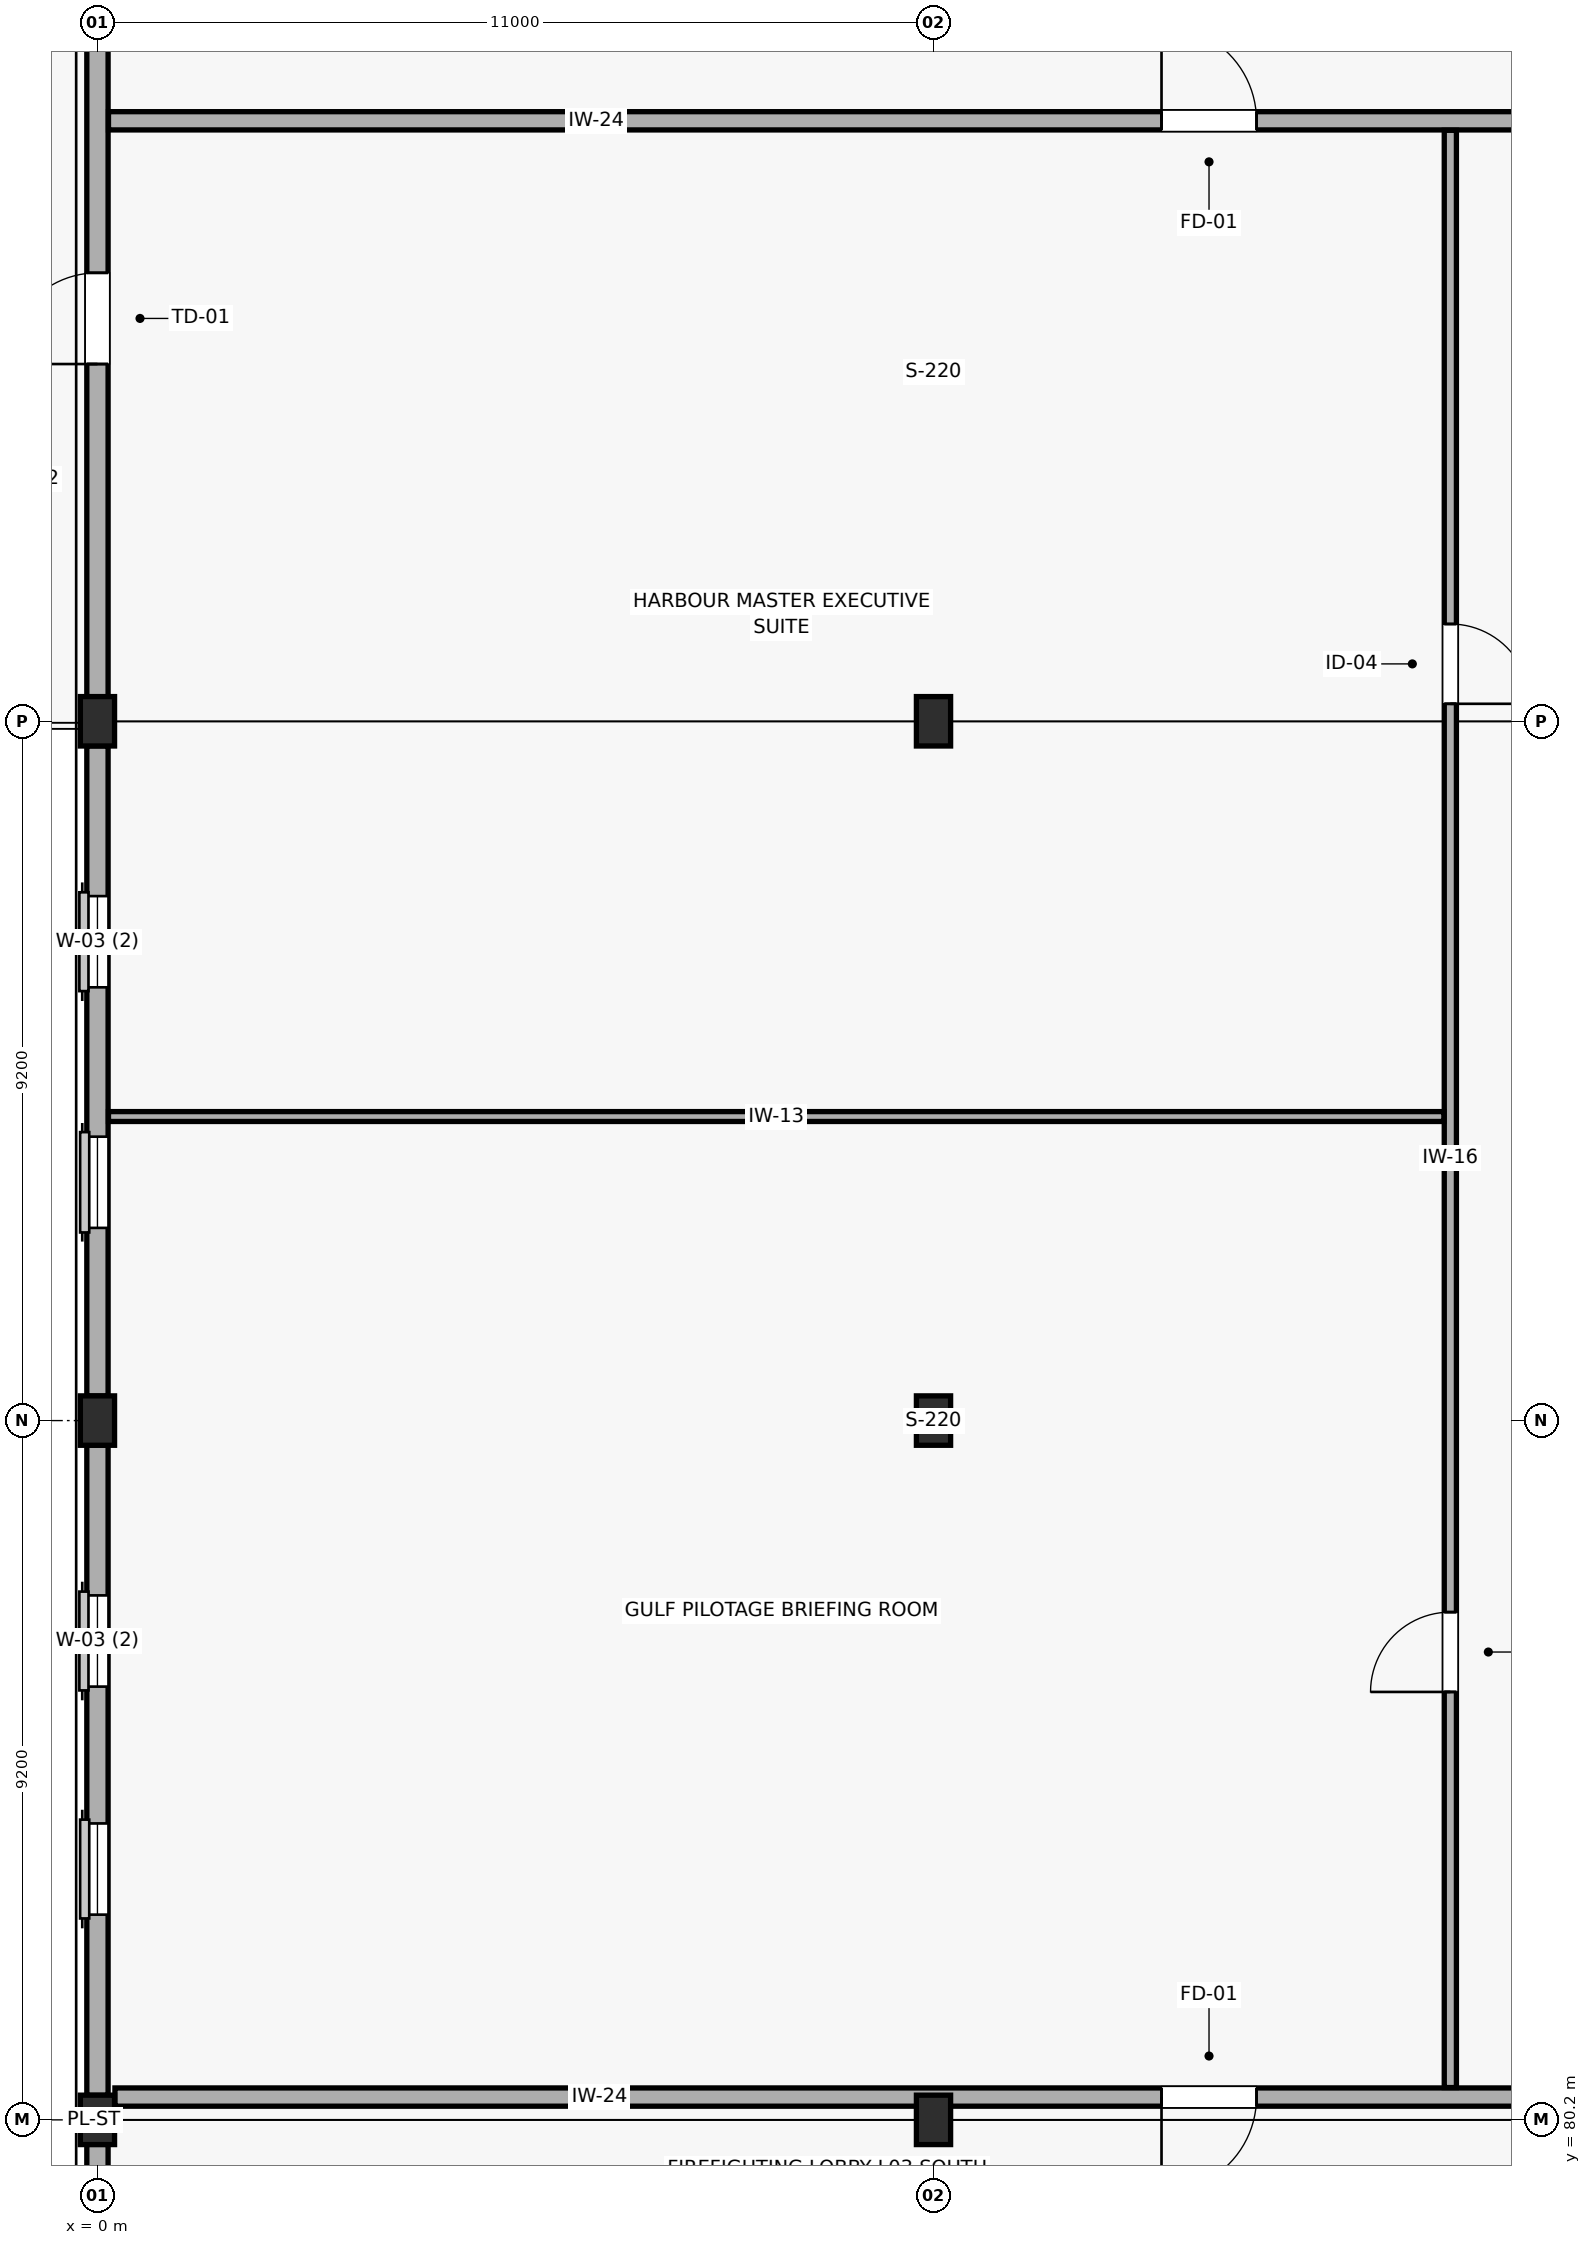
"""IFC4 building model, lengths in metres.
Left out: names, types, materials, properties, quantities, classifications, styles, units other than length and angle.
Written with IfcOpenShell. Run it as: python <this file> out.ifc"""

import sys

from ifc_helpers import new_model, si_unit, direction, frame, frame_2d, origin, origin_2d, place, context, subcontext, project, spatial, rectangle, extrude, element, fill, save


model = new_model("IFC4")
c1 = context("Model", 3, precision=1e-05, world=origin(), true_north=direction((0.0, 1.0)))
c2 = subcontext(c1, "Body", "Model", "MODEL_VIEW")
j1 = project(units=[si_unit("LENGTHUNIT", "METRE"), si_unit("PLANEANGLEUNIT", "RADIAN")], contexts=[c1])
p1 = place(None, origin())
s1 = spatial("IfcSite", under=j1, at=p1, CompositionType="ELEMENT")
p2 = place(p1, origin())
s2 = spatial("IfcBuilding", under=s1, at=p2, CompositionType="ELEMENT")
p3 = place(p2, frame((0.0, 0.0, 14.1)))
s3 = spatial("IfcBuildingStorey", under=s2, at=p3, CompositionType="ELEMENT", Elevation=14.1)
for number, where, z_axis, x_axis in (
    (1, (0.0, 80.2, 0.0), (0.0, 0.0, 1.0), (1.0, 0.0, 0.0)),
    (2, (0.0, 89.4, 0.0), (0.0, 0.0, 1.0), (1.0, 0.0, 0.0)),
    (3, (0.0, 98.6, 0.0), (0.0, 0.0, 1.0), (1.0, 0.0, 0.0)),
    (4, (11.0, 80.2, 0.0), (0.0, 0.0, 1.0), (1.0, 0.0, 0.0)),
    (5, (11.0, 89.4, 0.0), (0.0, 0.0, 1.0), (1.0, 0.0, 0.0)),
    (6, (11.0, 98.6, 0.0), (0.0, 0.0, 1.0), (1.0, 0.0, 0.0)),
):
    element("IfcColumn", number, at=place(p3, frame(where, z_axis=z_axis, x_axis=x_axis)), inside=s3, PredefinedType="COLUMN", context=c2, shape_type="SweptSolid", body=[
        extrude(rectangle(XDim=0.45, YDim=0.65, at=origin_2d()), origin(), (0.0, 0.0, 1.0), 4.2),
    ])
p4 = place(p3, frame((0.0, 79.877, 0.0), z_axis=(0.0, 0.0, 1.0), x_axis=(0.0, -1.0, 0.0)))
e7 = element("IfcWall", 7, at=p4, inside=s3, PredefinedType="SOLIDWALL", context=c2, shape_type="SweptSolid", body=[
    extrude(rectangle(XDim=7.954, YDim=0.28, at=frame_2d((3.977, 0.0))), origin(), (0.0, 0.0, 1.0), 3.439),
])
p5 = place(p4, frame((1.977, 0.0, 0.95)))
e8 = element("IfcOpeningElement", 8, at=p5, cuts=e7, PredefinedType="OPENING", context=c2, shape_type="SweptSolid", body=[
    extrude(rectangle(XDim=1.8, YDim=1.8, at=frame_2d((0.9, 0.9))), frame((0.0, 0.15, 0.0), z_axis=(0.0, -1.0, 0.0), x_axis=(1.0, 0.0, 0.0)), (0.0, 0.0, 1.0), 0.3),
])
p6 = place(p4, frame((4.977, 0.0, 0.95)))
e9 = element("IfcOpeningElement", 9, at=p6, cuts=e7, PredefinedType="OPENING", context=c2, shape_type="SweptSolid", body=[
    extrude(rectangle(XDim=1.8, YDim=1.8, at=frame_2d((0.9, 0.9))), frame((0.0, 0.15, 0.0), z_axis=(0.0, -1.0, 0.0), x_axis=(1.0, 0.0, 0.0)), (0.0, 0.0, 1.0), 0.3),
])
p7 = place(p3, frame((0.0, 89.077, 0.0), z_axis=(0.0, 0.0, 1.0), x_axis=(0.0, -1.0, 0.0)))
e10 = element("IfcWall", 10, at=p7, inside=s3, PredefinedType="SOLIDWALL", context=c2, shape_type="SweptSolid", body=[
    extrude(rectangle(XDim=8.554, YDim=0.28, at=frame_2d((4.277, 0.0))), origin(), (0.0, 0.0, 1.0), 3.439),
])
p8 = place(p7, frame((1.977, 0.0, 0.95)))
e11 = element("IfcOpeningElement", 11, at=p8, cuts=e10, PredefinedType="OPENING", context=c2, shape_type="SweptSolid", body=[
    extrude(rectangle(XDim=1.2, YDim=1.8, at=frame_2d((0.6, 0.9))), frame((0.0, 0.15, 0.0), z_axis=(0.0, -1.0, 0.0), x_axis=(1.0, 0.0, 0.0)), (0.0, 0.0, 1.0), 0.3),
])
p9 = place(p7, frame((4.977, 0.0, 0.95)))
e12 = element("IfcOpeningElement", 12, at=p9, cuts=e10, PredefinedType="OPENING", context=c2, shape_type="SweptSolid", body=[
    extrude(rectangle(XDim=1.2, YDim=1.8, at=frame_2d((0.6, 0.9))), frame((0.0, 0.15, 0.0), z_axis=(0.0, -1.0, 0.0), x_axis=(1.0, 0.0, 0.0)), (0.0, 0.0, 1.0), 0.3),
])
p10 = place(p3, frame((0.0, 98.277, 0.0), z_axis=(0.0, 0.0, 1.0), x_axis=(0.0, -1.0, 0.0)))
e13 = element("IfcWall", 13, at=p10, inside=s3, PredefinedType="SOLIDWALL", context=c2, shape_type="SweptSolid", body=[
    extrude(rectangle(XDim=8.554, YDim=0.28, at=frame_2d((4.277, 0.0))), origin(), (0.0, 0.0, 1.0), 3.439),
])
p11 = place(p10, frame((1.977, 0.0, 0.95)))
e14 = element("IfcOpeningElement", 14, at=p11, cuts=e13, PredefinedType="OPENING", context=c2, shape_type="SweptSolid", body=[
    extrude(rectangle(XDim=1.2, YDim=1.8, at=frame_2d((0.6, 0.9))), frame((0.0, 0.15, 0.0), z_axis=(0.0, -1.0, 0.0), x_axis=(1.0, 0.0, 0.0)), (0.0, 0.0, 1.0), 0.3),
])
p12 = place(p10, frame((5.142, 0.0, 0.95)))
e15 = element("IfcOpeningElement", 15, at=p12, cuts=e13, PredefinedType="OPENING", context=c2, shape_type="SweptSolid", body=[
    extrude(rectangle(XDim=1.2, YDim=1.8, at=frame_2d((0.6, 0.9))), frame((0.0, 0.15, 0.0), z_axis=(0.0, -1.0, 0.0), x_axis=(1.0, 0.0, 0.0)), (0.0, 0.0, 1.0), 0.3),
])
p13 = place(p3, frame((0.0, 107.477, 0.0), z_axis=(0.0, 0.0, 1.0), x_axis=(0.0, -1.0, 0.0)))
e16 = element("IfcWall", 16, at=p13, inside=s3, PredefinedType="SOLIDWALL", context=c2, shape_type="SweptSolid", body=[
    extrude(rectangle(XDim=8.554, YDim=0.28, at=frame_2d((4.277, 0.0))), origin(), (0.0, 0.0, 1.0), 3.439),
])
p14 = place(p13, frame((2.977, 0.0, 0.0)))
e17 = element("IfcOpeningElement", 17, at=p14, cuts=e16, PredefinedType="OPENING", context=c2, shape_type="SweptSolid", body=[
    extrude(rectangle(XDim=1.2, YDim=2.2, at=frame_2d((0.6, 1.1))), frame((0.0, 0.15, 0.0), z_axis=(0.0, -1.0, 0.0), x_axis=(1.0, 0.0, 0.0)), (0.0, 0.0, 1.0), 0.3),
])
p15 = place(p3, frame((0.145, 106.5, 0.0), z_axis=(0.0, 0.0, 1.0), x_axis=(1.0, 0.0, 0.0)))
e18 = element("IfcWall", 18, at=p15, inside=s3, PredefinedType="PARTITIONING", context=c2, shape_type="SweptSolid", body=[
    extrude(rectangle(XDim=18.68, YDim=0.24, at=frame_2d((9.34, 0.0))), origin(), (0.0, 0.0, 1.0), 3.439),
])
p16 = place(p15, frame((13.855, 0.0, 0.0)))
e19 = element("IfcOpeningElement", 19, at=p16, cuts=e18, PredefinedType="OPENING", context=c2, shape_type="SweptSolid", body=[
    extrude(rectangle(XDim=1.25, YDim=2.2, at=frame_2d((0.625, 1.1))), frame((0.0, 0.13, 0.0), z_axis=(0.0, -1.0, 0.0), x_axis=(1.0, 0.0, 0.0)), (0.0, 0.0, 1.0), 0.26),
])
p17 = place(p3, frame((0.23, 80.5, 0.0), z_axis=(0.0, 0.0, 1.0), x_axis=(1.0, 0.0, 0.0)))
e20 = element("IfcWall", 20, at=p17, inside=s3, PredefinedType="PARTITIONING", context=c2, shape_type="SweptSolid", body=[
    extrude(rectangle(XDim=18.595, YDim=0.24, at=frame_2d((9.297, 0.0))), origin(), (0.0, 0.0, 1.0), 3.439),
])
p18 = place(p17, frame((13.77, 0.0, 0.0)))
e21 = element("IfcOpeningElement", 21, at=p18, cuts=e20, PredefinedType="OPENING", context=c2, shape_type="SweptSolid", body=[
    extrude(rectangle(XDim=1.25, YDim=2.2, at=frame_2d((0.625, 1.1))), frame((0.0, 0.13, 0.0), z_axis=(0.0, -1.0, 0.0), x_axis=(1.0, 0.0, 0.0)), (0.0, 0.0, 1.0), 0.26),
])
p19 = place(p3, frame((17.8, 80.625, 0.0), z_axis=(0.0, 0.0, 1.0), x_axis=(0.0, 1.0, 0.0)))
e22 = element("IfcWall", 22, at=p19, inside=s3, PredefinedType="PARTITIONING", context=c2, shape_type="SweptSolid", body=[
    extrude(rectangle(XDim=25.75, YDim=0.16, at=frame_2d((12.875, 0.0))), origin(), (0.0, 0.0, 1.0), 3.437),
])
p20 = place(p19, frame((5.205, 0.0, 0.0)))
e23 = element("IfcOpeningElement", 23, at=p20, cuts=e22, PredefinedType="OPENING", context=c2, shape_type="SweptSolid", body=[
    extrude(rectangle(XDim=1.05, YDim=2.2, at=frame_2d((0.525, 1.1))), frame((0.0, 0.09, 0.0), z_axis=(0.0, -1.0, 0.0), x_axis=(1.0, 0.0, 0.0)), (0.0, 0.0, 1.0), 0.18),
])
p21 = place(p19, frame((18.205, 0.0, 0.0)))
e24 = element("IfcOpeningElement", 24, at=p21, cuts=e22, PredefinedType="OPENING", context=c2, shape_type="SweptSolid", body=[
    extrude(rectangle(XDim=1.05, YDim=2.2, at=frame_2d((0.525, 1.1))), frame((0.0, 0.09, 0.0), z_axis=(0.0, -1.0, 0.0), x_axis=(1.0, 0.0, 0.0)), (0.0, 0.0, 1.0), 0.18),
])
p22 = place(p3, frame((0.145, 93.4, 0.0), z_axis=(0.0, 0.0, 1.0), x_axis=(1.0, 0.0, 0.0)))
e25 = element("IfcWall", 25, at=p22, inside=s3, PredefinedType="PARTITIONING", context=c2, shape_type="SweptSolid", body=[
    extrude(rectangle(XDim=17.57, YDim=0.13, at=frame_2d((8.785, 0.0))), origin(), (0.0, 0.0, 1.0), 3.439),
])
p23 = place(p8, origin())
e26 = element("IfcWindow", 26, at=p23, inside=s3, PartitioningType="SINGLE_PANEL", PredefinedType="WINDOW", context=c2, shape_type="SweptSolid", body=[
    extrude(rectangle(XDim=1.2, YDim=1.8, at=frame_2d((0.6, 0.9))), frame((0.0, 0.03, 0.0), z_axis=(0.0, -1.0, 0.0), x_axis=(1.0, 0.0, 0.0)), (0.0, 0.0, 1.0), 0.06),
])
fill(e11, e26)
p24 = place(p9, origin())
e27 = element("IfcWindow", 27, at=p24, inside=s3, PartitioningType="SINGLE_PANEL", PredefinedType="WINDOW", context=c2, shape_type="SweptSolid", body=[
    extrude(rectangle(XDim=1.2, YDim=1.8, at=frame_2d((0.6, 0.9))), frame((0.0, 0.03, 0.0), z_axis=(0.0, -1.0, 0.0), x_axis=(1.0, 0.0, 0.0)), (0.0, 0.0, 1.0), 0.06),
])
fill(e12, e27)
p25 = place(p11, origin())
e28 = element("IfcWindow", 28, at=p25, inside=s3, PartitioningType="SINGLE_PANEL", PredefinedType="WINDOW", context=c2, shape_type="SweptSolid", body=[
    extrude(rectangle(XDim=1.2, YDim=1.8, at=frame_2d((0.6, 0.9))), frame((0.0, 0.03, 0.0), z_axis=(0.0, -1.0, 0.0), x_axis=(1.0, 0.0, 0.0)), (0.0, 0.0, 1.0), 0.06),
])
fill(e14, e28)
p26 = place(p12, origin())
e29 = element("IfcWindow", 29, at=p26, inside=s3, PartitioningType="SINGLE_PANEL", PredefinedType="WINDOW", context=c2, shape_type="SweptSolid", body=[
    extrude(rectangle(XDim=1.2, YDim=1.8, at=frame_2d((0.6, 0.9))), frame((0.0, 0.03, 0.0), z_axis=(0.0, -1.0, 0.0), x_axis=(1.0, 0.0, 0.0)), (0.0, 0.0, 1.0), 0.06),
])
fill(e15, e29)
p27 = place(p14, frame((1.2, 0.0, 0.0), z_axis=(0.0, 0.0, 1.0), x_axis=(-1.0, 0.0, 0.0)))
e30 = element("IfcDoor", 30, at=p27, inside=s3, OperationType="SINGLE_SWING_LEFT", PredefinedType="DOOR", context=c2, shape_type="SweptSolid", body=[
    extrude(rectangle(XDim=1.2, YDim=2.2, at=frame_2d((0.6, 1.1))), frame((0.0, 0.025, 0.0), z_axis=(0.0, -1.0, 0.0), x_axis=(1.0, 0.0, 0.0)), (0.0, 0.0, 1.0), 0.05),
])
fill(e17, e30)
p28 = place(p16, origin())
e31 = element("IfcDoor", 31, at=p28, inside=s3, OperationType="SINGLE_SWING_LEFT", PredefinedType="DOOR", context=c2, shape_type="SweptSolid", body=[
    extrude(rectangle(XDim=1.25, YDim=2.2, at=frame_2d((0.625, 1.1))), frame((0.0, 0.025, 0.0), z_axis=(0.0, -1.0, 0.0), x_axis=(1.0, 0.0, 0.0)), (0.0, 0.0, 1.0), 0.05),
])
fill(e19, e31)
p29 = place(p18, frame((1.25, 0.0, 0.0), z_axis=(0.0, 0.0, 1.0), x_axis=(-1.0, 0.0, 0.0)))
e32 = element("IfcDoor", 32, at=p29, inside=s3, OperationType="SINGLE_SWING_RIGHT", PredefinedType="DOOR", context=c2, shape_type="SweptSolid", body=[
    extrude(rectangle(XDim=1.25, YDim=2.2, at=frame_2d((0.625, 1.1))), frame((0.0, 0.025, 0.0), z_axis=(0.0, -1.0, 0.0), x_axis=(1.0, 0.0, 0.0)), (0.0, 0.0, 1.0), 0.05),
])
fill(e21, e32)
p30 = place(p20, origin())
e33 = element("IfcDoor", 33, at=p30, inside=s3, OperationType="SINGLE_SWING_LEFT", PredefinedType="DOOR", context=c2, shape_type="SweptSolid", body=[
    extrude(rectangle(XDim=1.05, YDim=2.2, at=frame_2d((0.525, 1.1))), frame((0.0, 0.025, 0.0), z_axis=(0.0, -1.0, 0.0), x_axis=(1.0, 0.0, 0.0)), (0.0, 0.0, 1.0), 0.05),
])
fill(e23, e33)
p31 = place(p21, frame((1.05, 0.0, 0.0), z_axis=(0.0, 0.0, 1.0), x_axis=(-1.0, 0.0, 0.0)))
e34 = element("IfcDoor", 34, at=p31, inside=s3, OperationType="SINGLE_SWING_RIGHT", PredefinedType="DOOR", context=c2, shape_type="SweptSolid", body=[
    extrude(rectangle(XDim=1.05, YDim=2.2, at=frame_2d((0.525, 1.1))), frame((0.0, 0.025, 0.0), z_axis=(0.0, -1.0, 0.0), x_axis=(1.0, 0.0, 0.0)), (0.0, 0.0, 1.0), 0.05),
])
fill(e24, e34)
save(model, sys.argv[1])
